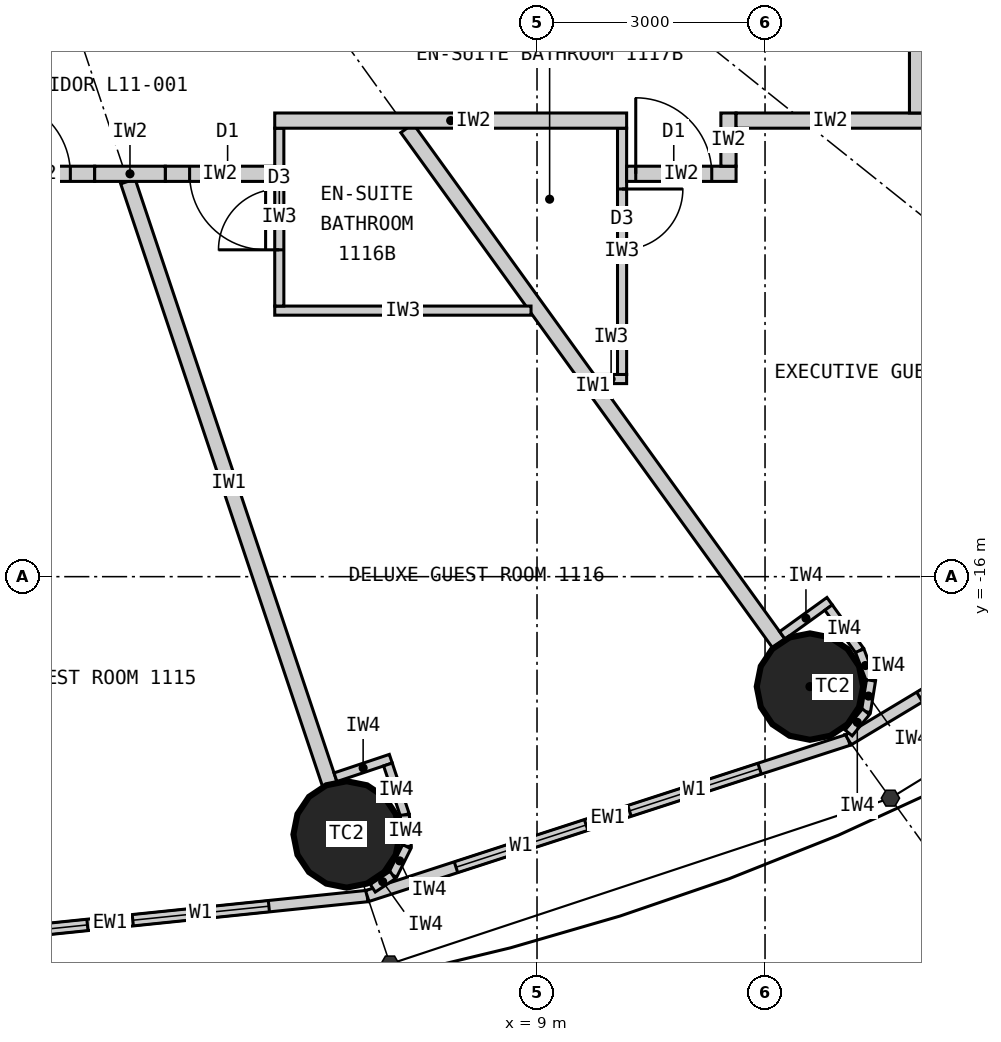
"""IFC4 building model, lengths in metres.
Left out: names, types, materials, properties, quantities, classifications, styles, units other than length and angle.
Written with IfcOpenShell. Run it as: python <this file> out.ifc"""

import sys

from ifc_helpers import new_model, si_unit, direction, frame, frame_2d, origin, origin_2d, place, context, subcontext, project, spatial, rectangle, circle, extrude, element, fill, save


model = new_model("IFC4")
c1 = context("Model", 3, precision=1e-05, world=origin(), true_north=direction((0.0, 1.0)))
c2 = subcontext(c1, "Body", "Model", "MODEL_VIEW")
j1 = project(units=[si_unit("LENGTHUNIT", "METRE"), si_unit("PLANEANGLEUNIT", "RADIAN")], contexts=[c1])
p1 = place(None, origin())
s1 = spatial("IfcSite", under=j1, at=p1, CompositionType="ELEMENT")
p2 = place(p1, origin())
s2 = spatial("IfcBuilding", under=s1, at=p2, CompositionType="ELEMENT")
p3 = place(p2, frame((0.0, 0.0, 50.7)))
s3 = spatial("IfcBuildingStorey", under=s2, at=p3, CompositionType="ELEMENT", Elevation=50.7)
for number, where, z_axis, x_axis in (
    (1, (6.495, -19.391, 0.0), (0.0, 0.0, 1.0), (1.0, 0.0, 0.0)),
    (2, (12.591, -17.447, 0.0), (0.0, 0.0, 1.0), (1.0, 0.0, 0.0)),
):
    element("IfcColumn", number, at=place(p3, frame(where, z_axis=z_axis, x_axis=x_axis)), inside=s3, PredefinedType="COLUMN", context=c2, shape_type="SweptSolid", body=[
        extrude(circle(Radius=0.7, at=origin_2d()), origin(), (0.0, 0.0, 1.0), 3.3),
    ])
p4 = place(p3, frame((0.0, -20.9, 0.0), z_axis=(0.0, 0.0, 1.0), x_axis=(0.994721394369, 0.102612609291, 0.0)))
e3 = element("IfcWall", 3, at=p4, inside=s3, PredefinedType="ELEMENTEDWALL", context=c2, shape_type="SweptSolid", body=[
    extrude(rectangle(XDim=6.802, YDim=0.15, at=frame_2d((3.401, 0.0))), origin(), (0.0, 0.0, 1.0), 3.12),
])
p5 = place(p4, frame((1.301, 0.0, 0.9)))
e4 = element("IfcOpeningElement", 4, at=p5, cuts=e3, PredefinedType="OPENING", context=c2, shape_type="SweptSolid", body=[
    extrude(rectangle(XDim=1.8, YDim=1.9, at=frame_2d((0.9, 0.95))), frame((0.0, 0.085, 0.0), z_axis=(0.0, -1.0, 0.0), x_axis=(1.0, 0.0, 0.0)), (0.0, 0.0, 1.0), 0.17),
])
p6 = place(p4, frame((3.701, 0.0, 0.9)))
e5 = element("IfcOpeningElement", 5, at=p6, cuts=e3, PredefinedType="OPENING", context=c2, shape_type="SweptSolid", body=[
    extrude(rectangle(XDim=1.8, YDim=1.9, at=frame_2d((0.9, 0.95))), frame((0.0, 0.085, 0.0), z_axis=(0.0, -1.0, 0.0), x_axis=(1.0, 0.0, 0.0)), (0.0, 0.0, 1.0), 0.17),
])
p7 = place(p3, frame((6.766, -20.202, 0.0), z_axis=(0.0, 0.0, 1.0), x_axis=(0.951137534625, 0.308767534285, 0.0)))
e6 = element("IfcWall", 6, at=p7, inside=s3, PredefinedType="ELEMENTEDWALL", context=c2, shape_type="SweptSolid", body=[
    extrude(rectangle(XDim=6.655, YDim=0.15, at=frame_2d((3.328, 0.0))), origin(), (0.0, 0.0, 1.0), 3.12),
])
p8 = place(p7, frame((1.228, 0.0, 0.9)))
e7 = element("IfcOpeningElement", 7, at=p8, cuts=e6, PredefinedType="OPENING", context=c2, shape_type="SweptSolid", body=[
    extrude(rectangle(XDim=1.8, YDim=1.9, at=frame_2d((0.9, 0.95))), frame((0.0, 0.085, 0.0), z_axis=(0.0, -1.0, 0.0), x_axis=(1.0, 0.0, 0.0)), (0.0, 0.0, 1.0), 0.17),
])
p9 = place(p7, frame((3.628, 0.0, 0.9)))
e8 = element("IfcOpeningElement", 8, at=p9, cuts=e6, PredefinedType="OPENING", context=c2, shape_type="SweptSolid", body=[
    extrude(rectangle(XDim=1.8, YDim=1.9, at=frame_2d((0.9, 0.95))), frame((0.0, 0.085, 0.0), z_axis=(0.0, -1.0, 0.0), x_axis=(1.0, 0.0, 0.0)), (0.0, 0.0, 1.0), 0.17),
])
p10 = place(p3, frame((13.096, -18.147, 0.0), z_axis=(0.0, 0.0, 1.0), x_axis=(0.856983180864, 0.515344377787, 0.0)))
e9 = element("IfcWall", 9, at=p10, inside=s3, PredefinedType="ELEMENTEDWALL", context=c2, shape_type="SweptSolid", body=[
    extrude(rectangle(XDim=6.386, YDim=0.15, at=frame_2d((3.193, 0.0))), origin(), (0.0, 0.0, 1.0), 3.12),
])
p11 = place(p10, frame((1.093, 0.0, 0.9)))
e10 = element("IfcOpeningElement", 10, at=p11, cuts=e9, PredefinedType="OPENING", context=c2, shape_type="SweptSolid", body=[
    extrude(rectangle(XDim=1.8, YDim=1.9, at=frame_2d((0.9, 0.95))), frame((0.0, 0.085, 0.0), z_axis=(0.0, -1.0, 0.0), x_axis=(1.0, 0.0, 0.0)), (0.0, 0.0, 1.0), 0.17),
])
p12 = place(p10, frame((3.493, 0.0, 0.9)))
e11 = element("IfcOpeningElement", 11, at=p12, cuts=e9, PredefinedType="OPENING", context=c2, shape_type="SweptSolid", body=[
    extrude(rectangle(XDim=1.8, YDim=1.9, at=frame_2d((0.9, 0.95))), frame((0.0, 0.085, 0.0), z_axis=(0.0, -1.0, 0.0), x_axis=(1.0, 0.0, 0.0)), (0.0, 0.0, 1.0), 0.17),
])
p13 = place(p3, frame((3.617, -10.8, 0.0), z_axis=(0.0, 0.0, 1.0), x_axis=(0.317576599239, -0.948232621046, 0.0)))
e12 = element("IfcWall", 12, at=p13, inside=s3, PredefinedType="PARTITIONING", context=c2, shape_type="SweptSolid", body=[
    extrude(rectangle(XDim=8.36, YDim=0.2, at=frame_2d((4.18, 0.0))), origin(), (0.0, 0.0, 1.0), 2.32),
])
p14 = place(p3, frame((7.289, -10.1, 0.0), z_axis=(0.0, 0.0, 1.0), x_axis=(0.585198353053, -0.810890182197, 0.0)))
e13 = element("IfcWall", 13, at=p14, inside=s3, PredefinedType="PARTITIONING", context=c2, shape_type="SweptSolid", body=[
    extrude(rectangle(XDim=8.36, YDim=0.2, at=frame_2d((4.18, 0.0))), origin(), (0.0, 0.0, 1.0), 2.32),
])
p15 = place(p3, frame((14.1, -8.639, 0.0), z_axis=(0.0, 0.0, 1.0), x_axis=(0.852672493023, -0.522445805459, 0.0)))
e14 = element("IfcWall", 14, at=p15, inside=s3, PredefinedType="PARTITIONING", context=c2, shape_type="SweptSolid", body=[
    extrude(rectangle(XDim=7.633, YDim=0.2, at=frame_2d((3.817, 0.0))), origin(), (0.0, 0.0, 1.0), 3.12),
])
p16 = place(p3, frame((8.921, -12.5, 0.0), z_axis=(0.0, 0.0, 1.0), x_axis=(-1.0, 0.0, 0.0)))
e15 = element("IfcWall", 15, at=p16, inside=s3, PredefinedType="PARTITIONING", context=c2, shape_type="SweptSolid", body=[
    extrude(rectangle(XDim=3.372, YDim=0.12, at=frame_2d((1.686, 0.0))), origin(), (0.0, 0.0, 1.0), 3.12),
])
p17 = place(p3, frame((5.609, -10.1, 0.0), z_axis=(0.0, 0.0, 1.0), x_axis=(0.0, -1.0, 0.0)))
e16 = element("IfcWall", 16, at=p17, inside=s3, PredefinedType="PARTITIONING", context=c2, shape_type="SweptSolid", body=[
    extrude(rectangle(XDim=2.34, YDim=0.12, at=frame_2d((1.17, 0.0))), origin(), (0.0, 0.0, 1.0), 3.12),
])
p18 = place(p17, frame((0.8, 0.0, 0.0)))
e17 = element("IfcOpeningElement", 17, at=p18, cuts=e16, PredefinedType="OPENING", context=c2, shape_type="SweptSolid", body=[
    extrude(rectangle(XDim=0.8, YDim=2.1, at=frame_2d((0.4, 1.05))), frame((0.0, 0.07, 0.0), z_axis=(0.0, -1.0, 0.0), x_axis=(1.0, 0.0, 0.0)), (0.0, 0.0, 1.0), 0.14),
])
p19 = place(p3, frame((9.771, -13.4, 0.0), z_axis=(0.0, 0.0, 1.0), x_axis=(1.0, 0.0, 0.0)))
e18 = element("IfcWall", 18, at=p19, inside=s3, PredefinedType="PARTITIONING", context=c2, shape_type="SweptSolid", body=[
    extrude(rectangle(XDim=0.408, YDim=0.12, at=frame_2d((0.204, 0.0))), origin(), (0.0, 0.0, 1.0), 3.12),
])
p20 = place(p3, frame((10.119, -10.1, 0.0), z_axis=(0.0, 0.0, 1.0), x_axis=(0.0, -1.0, 0.0)))
e19 = element("IfcWall", 19, at=p20, inside=s3, PredefinedType="PARTITIONING", context=c2, shape_type="SweptSolid", body=[
    extrude(rectangle(XDim=3.24, YDim=0.12, at=frame_2d((1.62, 0.0))), origin(), (0.0, 0.0, 1.0), 3.12),
])
p21 = place(p20, frame((0.8, 0.0, 0.0)))
e20 = element("IfcOpeningElement", 20, at=p21, cuts=e19, PredefinedType="OPENING", context=c2, shape_type="SweptSolid", body=[
    extrude(rectangle(XDim=0.8, YDim=2.1, at=frame_2d((0.4, 1.05))), frame((0.0, 0.07, 0.0), z_axis=(0.0, -1.0, 0.0), x_axis=(1.0, 0.0, 0.0)), (0.0, 0.0, 1.0), 0.14),
])
p22 = place(p3, frame((3.18, -10.7, 0.0), z_axis=(0.0, 0.0, 1.0), x_axis=(-1.0, 0.0, 0.0)))
e21 = element("IfcWall", 21, at=p22, inside=s3, PredefinedType="PARTITIONING", context=c2, shape_type="SweptSolid", body=[
    extrude(rectangle(XDim=1.44, YDim=0.2, at=frame_2d((0.72, 0.0))), origin(), (0.0, 0.0, 1.0), 3.12),
])
p23 = place(p22, frame((0.32, 0.0, 0.0)))
e22 = element("IfcOpeningElement", 22, at=p23, cuts=e21, PredefinedType="OPENING", context=c2, shape_type="SweptSolid", body=[
    extrude(rectangle(XDim=1.0, YDim=2.2, at=frame_2d((0.5, 1.1))), frame((0.0, 0.11, 0.0), z_axis=(0.0, -1.0, 0.0), x_axis=(1.0, 0.0, 0.0)), (0.0, 0.0, 1.0), 0.22),
])
p24 = place(p3, frame((5.549, -10.7, 0.0), z_axis=(0.0, 0.0, 1.0), x_axis=(-1.0, 0.0, 0.0)))
e23 = element("IfcWall", 23, at=p24, inside=s3, PredefinedType="PARTITIONING", context=c2, shape_type="SweptSolid", body=[
    extrude(rectangle(XDim=1.44, YDim=0.2, at=frame_2d((0.72, 0.0))), origin(), (0.0, 0.0, 1.0), 3.12),
])
p25 = place(p24, frame((0.12, 0.0, 0.0)))
e24 = element("IfcOpeningElement", 24, at=p25, cuts=e23, PredefinedType="OPENING", context=c2, shape_type="SweptSolid", body=[
    extrude(rectangle(XDim=1.0, YDim=2.2, at=frame_2d((0.5, 1.1))), frame((0.0, 0.11, 0.0), z_axis=(0.0, -1.0, 0.0), x_axis=(1.0, 0.0, 0.0)), (0.0, 0.0, 1.0), 0.22),
])
p26 = place(p3, frame((11.619, -10.7, 0.0), z_axis=(0.0, 0.0, 1.0), x_axis=(-1.0, 0.0, 0.0)))
e25 = element("IfcWall", 25, at=p26, inside=s3, PredefinedType="PARTITIONING", context=c2, shape_type="SweptSolid", body=[
    extrude(rectangle(XDim=1.44, YDim=0.2, at=frame_2d((0.72, 0.0))), origin(), (0.0, 0.0, 1.0), 3.12),
])
p27 = place(p26, frame((0.32, 0.0, 0.0)))
e26 = element("IfcOpeningElement", 26, at=p27, cuts=e25, PredefinedType="OPENING", context=c2, shape_type="SweptSolid", body=[
    extrude(rectangle(XDim=1.0, YDim=2.2, at=frame_2d((0.5, 1.1))), frame((0.0, 0.11, 0.0), z_axis=(0.0, -1.0, 0.0), x_axis=(1.0, 0.0, 0.0)), (0.0, 0.0, 1.0), 0.22),
])
p28 = place(p3, frame((11.519, -9.9, 0.0), z_axis=(0.0, 0.0, 1.0), x_axis=(0.0, -1.0, 0.0)))
e27 = element("IfcWall", 27, at=p28, inside=s3, PredefinedType="PARTITIONING", context=c2, shape_type="SweptSolid", body=[
    extrude(rectangle(XDim=0.7, YDim=0.2, at=frame_2d((0.35, 0.0))), origin(), (0.0, 0.0, 1.0), 3.12),
])
p29 = place(p3, frame((4.109, -10.7, 0.0), z_axis=(0.0, 0.0, 1.0), x_axis=(-1.0, 0.0, 0.0)))
e28 = element("IfcWall", 28, at=p29, inside=s3, PredefinedType="PARTITIONING", context=c2, shape_type="SweptSolid", body=[
    extrude(rectangle(XDim=0.929, YDim=0.2, at=frame_2d((0.465, 0.0))), origin(), (0.0, 0.0, 1.0), 3.12),
])
p30 = place(p3, frame((14.1, -10.0, 0.0), z_axis=(0.0, 0.0, 1.0), x_axis=(-1.0, 0.0, 0.0)))
e29 = element("IfcWall", 29, at=p30, inside=s3, PredefinedType="PARTITIONING", context=c2, shape_type="SweptSolid", body=[
    extrude(rectangle(XDim=2.481, YDim=0.2, at=frame_2d((1.24, 0.0))), origin(), (0.0, 0.0, 1.0), 3.12),
])
p31 = place(p3, frame((10.179, -10.0, 0.0), z_axis=(0.0, 0.0, 1.0), x_axis=(-1.0, 0.0, 0.0)))
e30 = element("IfcWall", 30, at=p31, inside=s3, PredefinedType="PARTITIONING", context=c2, shape_type="SweptSolid", body=[
    extrude(rectangle(XDim=4.63, YDim=0.2, at=frame_2d((2.315, 0.0))), origin(), (0.0, 0.0, 1.0), 3.12),
])
p32 = place(p3, frame((14.0, -9.9, 0.0), z_axis=(0.0, 0.0, 1.0), x_axis=(0.0, 1.0, 0.0)))
e31 = element("IfcWall", 31, at=p32, inside=s3, PredefinedType="PARTITIONING", context=c2, shape_type="SweptSolid", body=[
    extrude(rectangle(XDim=3.001, YDim=0.2, at=frame_2d((1.5, 0.0))), origin(), (0.0, 0.0, 1.0), 3.12),
])
p33 = place(p3, frame((6.348, -18.639, 0.0), z_axis=(0.0, 0.0, 1.0), x_axis=(0.948268951266, 0.317468102437, 0.0)))
e32 = element("IfcWall", 32, at=p33, inside=s3, PredefinedType="PARTITIONING", context=c2, shape_type="SweptSolid", body=[
    extrude(rectangle(XDim=0.768, YDim=0.12, at=frame_2d((0.384, 0.0))), origin(), (0.0, 0.0, 1.0), 3.12),
])
p34 = place(p3, frame((7.038, -18.471, 0.0), z_axis=(0.0, 0.0, 1.0), x_axis=(0.317378466199, -0.9482989556, 0.0)))
e33 = element("IfcWall", 33, at=p34, inside=s3, PredefinedType="PARTITIONING", context=c2, shape_type="SweptSolid", body=[
    extrude(rectangle(XDim=0.7, YDim=0.12, at=frame_2d((0.35, 0.0))), origin(), (0.0, 0.0, 1.0), 3.12),
])
p35 = place(p3, frame((7.26, -19.135, 0.0), z_axis=(0.0, 0.0, 1.0), x_axis=(0.0613238046, -0.99811792439, 0.0)))
e34 = element("IfcWall", 34, at=p35, inside=s3, PredefinedType="PARTITIONING", context=c2, shape_type="SweptSolid", body=[
    extrude(rectangle(XDim=0.418, YDim=0.12, at=frame_2d((0.209, 0.0))), origin(), (0.0, 0.0, 1.0), 3.12),
])
p36 = place(p3, frame((7.286, -19.552, 0.0), z_axis=(0.0, 0.0, 1.0), x_axis=(-0.445810757773, -0.89512723579, 0.0)))
e35 = element("IfcWall", 35, at=p36, inside=s3, PredefinedType="PARTITIONING", context=c2, shape_type="SweptSolid", body=[
    extrude(rectangle(XDim=0.418, YDim=0.12, at=frame_2d((0.209, 0.0))), origin(), (0.0, 0.0, 1.0), 3.12),
])
p37 = place(p3, frame((7.1, -19.926, 0.0), z_axis=(0.0, 0.0, 1.0), x_axis=(-0.833488262509, -0.552537162787, 0.0)))
e36 = element("IfcWall", 36, at=p37, inside=s3, PredefinedType="PARTITIONING", context=c2, shape_type="SweptSolid", body=[
    extrude(rectangle(XDim=0.313, YDim=0.12, at=frame_2d((0.156, 0.0))), origin(), (0.0, 0.0, 1.0), 3.12),
])
p38 = place(p3, frame((12.227, -16.772, 0.0), z_axis=(0.0, 0.0, 1.0), x_axis=(0.810821798253, 0.585293098778, 0.0)))
e37 = element("IfcWall", 37, at=p38, inside=s3, PredefinedType="PARTITIONING", context=c2, shape_type="SweptSolid", body=[
    extrude(rectangle(XDim=0.768, YDim=0.12, at=frame_2d((0.384, 0.0))), origin(), (0.0, 0.0, 1.0), 3.12),
])
p39 = place(p3, frame((12.836, -16.406, 0.0), z_axis=(0.0, 0.0, 1.0), x_axis=(0.585223113993, -0.810872312296, 0.0)))
e38 = element("IfcWall", 38, at=p39, inside=s3, PredefinedType="PARTITIONING", context=c2, shape_type="SweptSolid", body=[
    extrude(rectangle(XDim=0.7, YDim=0.12, at=frame_2d((0.35, 0.0))), origin(), (0.0, 0.0, 1.0), 3.12),
])
p40 = place(p3, frame((13.246, -16.974, 0.0), z_axis=(0.0, 0.0, 1.0), x_axis=(0.355728122235, -0.934589483705, 0.0)))
e39 = element("IfcWall", 39, at=p40, inside=s3, PredefinedType="PARTITIONING", context=c2, shape_type="SweptSolid", body=[
    extrude(rectangle(XDim=0.418, YDim=0.12, at=frame_2d((0.209, 0.0))), origin(), (0.0, 0.0, 1.0), 3.12),
])
p41 = place(p3, frame((13.394, -17.365, 0.0), z_axis=(0.0, 0.0, 1.0), x_axis=(-0.159379276926, -0.987217425943, 0.0)))
e40 = element("IfcWall", 40, at=p41, inside=s3, PredefinedType="PARTITIONING", context=c2, shape_type="SweptSolid", body=[
    extrude(rectangle(XDim=0.418, YDim=0.12, at=frame_2d((0.209, 0.0))), origin(), (0.0, 0.0, 1.0), 3.12),
])
p42 = place(p3, frame((13.328, -17.777, 0.0), z_axis=(0.0, 0.0, 1.0), x_axis=(-0.632276783541, -0.774742582407, 0.0)))
e41 = element("IfcWall", 41, at=p42, inside=s3, PredefinedType="PARTITIONING", context=c2, shape_type="SweptSolid", body=[
    extrude(rectangle(XDim=0.36, YDim=0.12, at=frame_2d((0.18, 0.0))), origin(), (0.0, 0.0, 1.0), 3.12),
])
p43 = place(p5, origin())
e42 = element("IfcWindow", 42, at=p43, inside=s3, PartitioningType="SINGLE_PANEL", PredefinedType="WINDOW", context=c2, shape_type="SweptSolid", body=[
    extrude(rectangle(XDim=1.8, YDim=1.9, at=frame_2d((0.9, 0.95))), frame((0.0, 0.03, 0.0), z_axis=(0.0, -1.0, 0.0), x_axis=(1.0, 0.0, 0.0)), (0.0, 0.0, 1.0), 0.06),
])
fill(e4, e42)
p44 = place(p6, origin())
e43 = element("IfcWindow", 43, at=p44, inside=s3, PartitioningType="SINGLE_PANEL", PredefinedType="WINDOW", context=c2, shape_type="SweptSolid", body=[
    extrude(rectangle(XDim=1.8, YDim=1.9, at=frame_2d((0.9, 0.95))), frame((0.0, 0.03, 0.0), z_axis=(0.0, -1.0, 0.0), x_axis=(1.0, 0.0, 0.0)), (0.0, 0.0, 1.0), 0.06),
])
fill(e5, e43)
p45 = place(p8, origin())
e44 = element("IfcWindow", 44, at=p45, inside=s3, PartitioningType="SINGLE_PANEL", PredefinedType="WINDOW", context=c2, shape_type="SweptSolid", body=[
    extrude(rectangle(XDim=1.8, YDim=1.9, at=frame_2d((0.9, 0.95))), frame((0.0, 0.03, 0.0), z_axis=(0.0, -1.0, 0.0), x_axis=(1.0, 0.0, 0.0)), (0.0, 0.0, 1.0), 0.06),
])
fill(e7, e44)
p46 = place(p9, origin())
e45 = element("IfcWindow", 45, at=p46, inside=s3, PartitioningType="SINGLE_PANEL", PredefinedType="WINDOW", context=c2, shape_type="SweptSolid", body=[
    extrude(rectangle(XDim=1.8, YDim=1.9, at=frame_2d((0.9, 0.95))), frame((0.0, 0.03, 0.0), z_axis=(0.0, -1.0, 0.0), x_axis=(1.0, 0.0, 0.0)), (0.0, 0.0, 1.0), 0.06),
])
fill(e8, e45)
p47 = place(p11, origin())
e46 = element("IfcWindow", 46, at=p47, inside=s3, PartitioningType="SINGLE_PANEL", PredefinedType="WINDOW", context=c2, shape_type="SweptSolid", body=[
    extrude(rectangle(XDim=1.8, YDim=1.9, at=frame_2d((0.9, 0.95))), frame((0.0, 0.03, 0.0), z_axis=(0.0, -1.0, 0.0), x_axis=(1.0, 0.0, 0.0)), (0.0, 0.0, 1.0), 0.06),
])
fill(e10, e46)
p48 = place(p23, origin())
e47 = element("IfcDoor", 47, at=p48, inside=s3, OperationType="SINGLE_SWING_RIGHT", PredefinedType="DOOR", context=c2, shape_type="SweptSolid", body=[
    extrude(rectangle(XDim=1.0, YDim=2.2, at=frame_2d((0.5, 1.1))), frame((0.0, 0.025, 0.0), z_axis=(0.0, -1.0, 0.0), x_axis=(1.0, 0.0, 0.0)), (0.0, 0.0, 1.0), 0.05),
])
fill(e22, e47)
p49 = place(p18, origin())
e48 = element("IfcDoor", 48, at=p49, inside=s3, OperationType="SINGLE_SWING_RIGHT", PredefinedType="DOOR", context=c2, shape_type="SweptSolid", body=[
    extrude(rectangle(XDim=0.8, YDim=2.1, at=frame_2d((0.4, 1.05))), frame((0.0, 0.025, 0.0), z_axis=(0.0, -1.0, 0.0), x_axis=(1.0, 0.0, 0.0)), (0.0, 0.0, 1.0), 0.05),
])
fill(e17, e48)
p50 = place(p25, origin())
e49 = element("IfcDoor", 49, at=p50, inside=s3, OperationType="SINGLE_SWING_LEFT", PredefinedType="DOOR", context=c2, shape_type="SweptSolid", body=[
    extrude(rectangle(XDim=1.0, YDim=2.2, at=frame_2d((0.5, 1.1))), frame((0.0, 0.025, 0.0), z_axis=(0.0, -1.0, 0.0), x_axis=(1.0, 0.0, 0.0)), (0.0, 0.0, 1.0), 0.05),
])
fill(e24, e49)
p51 = place(p21, origin())
e50 = element("IfcDoor", 50, at=p51, inside=s3, OperationType="SINGLE_SWING_LEFT", PredefinedType="DOOR", context=c2, shape_type="SweptSolid", body=[
    extrude(rectangle(XDim=0.8, YDim=2.1, at=frame_2d((0.4, 1.05))), frame((0.0, 0.025, 0.0), z_axis=(0.0, -1.0, 0.0), x_axis=(1.0, 0.0, 0.0)), (0.0, 0.0, 1.0), 0.05),
])
fill(e20, e50)
p52 = place(p27, origin())
e51 = element("IfcDoor", 51, at=p52, inside=s3, OperationType="SINGLE_SWING_RIGHT", PredefinedType="DOOR", context=c2, shape_type="SweptSolid", body=[
    extrude(rectangle(XDim=1.0, YDim=2.2, at=frame_2d((0.5, 1.1))), frame((0.0, 0.025, 0.0), z_axis=(0.0, -1.0, 0.0), x_axis=(1.0, 0.0, 0.0)), (0.0, 0.0, 1.0), 0.05),
])
fill(e26, e51)
save(model, sys.argv[1])
